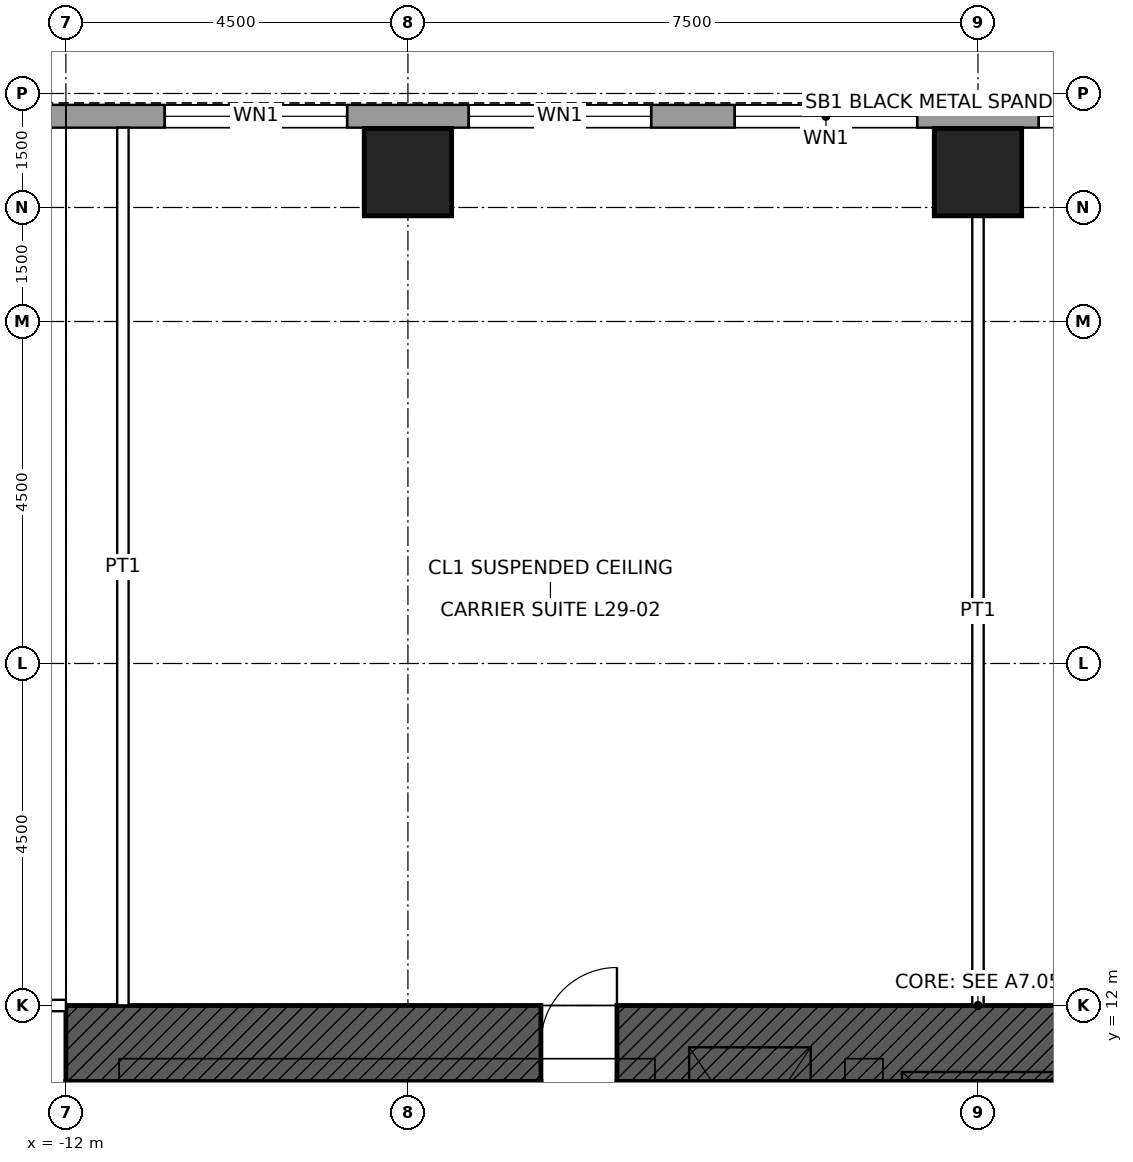
"""IFC4 building model, lengths in metres.
Left out: names, types, materials, properties, quantities, classifications, styles, units other than length and angle.
Written with IfcOpenShell. Run it as: python <this file> out.ifc"""

import sys

from ifc_helpers import new_model, si_unit, direction, frame, frame_2d, origin, origin_2d, place, context, subcontext, project, spatial, rectangle, hollow_rectangle, extrude, element, fill, save


model = new_model("IFC4")
c1 = context("Model", 3, precision=1e-05, world=origin(), true_north=direction((0.0, 1.0)))
c2 = subcontext(c1, "Body", "Model", "MODEL_VIEW")
j1 = project(units=[si_unit("LENGTHUNIT", "METRE"), si_unit("PLANEANGLEUNIT", "RADIAN")], contexts=[c1])
p1 = place(None, origin())
s1 = spatial("IfcSite", under=j1, at=p1, CompositionType="ELEMENT")
p2 = place(p1, origin())
s2 = spatial("IfcBuilding", under=s1, at=p2, CompositionType="ELEMENT")
p3 = place(p2, frame((0.0, 0.0, 144.9)))
s3 = spatial("IfcBuildingStorey", under=s2, at=p3, CompositionType="ELEMENT", Elevation=144.9)
for number, where, z_axis, x_axis in (
    (1, (-7.5, 22.965, 0.0), (0.0, 0.0, 1.0), (1.0, 0.0, 0.0)),
    (2, (0.0, 22.965, 0.0), (0.0, 0.0, 1.0), (1.0, 0.0, 0.0)),
):
    element("IfcColumn", number, at=place(p3, frame(where, z_axis=z_axis, x_axis=x_axis)), inside=s3, PredefinedType="COLUMN", context=c2, shape_type="SweptSolid", body=[
        extrude(hollow_rectangle(XDim=1.15, YDim=1.15, WallThickness=0.075, at=origin_2d()), origin(), (0.0, 0.0, 1.0), 4.5),
    ])
p4 = place(p3, frame((-12.0, 11.5, 0.0), z_axis=(0.0, 0.0, 1.0), x_axis=(1.0, 0.0, 0.0)))
e3 = element("IfcWall", 3, at=p4, inside=s3, PredefinedType="SHEAR", context=c2, shape_type="SweptSolid", body=[
    extrude(rectangle(XDim=24.0, YDim=1.0, at=frame_2d((12.0, 0.0))), origin(), (0.0, 0.0, 1.0), 4.5),
])
p5 = place(p4, frame((6.25, 0.0, 0.0)))
e4 = element("IfcOpeningElement", 4, at=p5, cuts=e3, PredefinedType="OPENING", context=c2, shape_type="SweptSolid", body=[
    extrude(rectangle(XDim=1.0, YDim=2.4, at=frame_2d((0.5, 1.2))), frame((0.0, 0.51, 0.0), z_axis=(0.0, -1.0, 0.0), x_axis=(1.0, 0.0, 0.0)), (0.0, 0.0, 1.0), 1.02),
])
p6 = place(p4, frame((16.75, 0.0, 0.0)))
e5 = element("IfcOpeningElement", 5, at=p6, cuts=e3, PredefinedType="OPENING", context=c2, shape_type="SweptSolid", body=[
    extrude(rectangle(XDim=1.0, YDim=2.4, at=frame_2d((0.5, 1.2))), frame((0.0, 0.51, 0.0), z_axis=(0.0, -1.0, 0.0), x_axis=(1.0, 0.0, 0.0)), (0.0, 0.0, 1.0), 1.02),
])
p7 = place(p3, frame((-16.2, 23.7, 0.0), z_axis=(0.0, 0.0, 1.0), x_axis=(1.0, 0.0, 0.0)))
e6 = element("IfcWall", 6, at=p7, inside=s3, PredefinedType="SOLIDWALL", context=c2, shape_type="SweptSolid", body=[
    extrude(rectangle(XDim=32.4, YDim=0.3, at=frame_2d((16.2, 0.0))), origin(), (0.0, 0.0, 1.0), 4.3),
])
p8 = place(p7, frame((0.95, 0.0, 1.0)))
e7 = element("IfcOpeningElement", 7, at=p8, cuts=e6, PredefinedType="OPENING", context=c2, shape_type="SweptSolid", body=[
    extrude(rectangle(XDim=1.8, YDim=1.2, at=frame_2d((0.9, 0.6))), frame((0.0, 0.16, 0.0), z_axis=(0.0, -1.0, 0.0), x_axis=(1.0, 0.0, 0.0)), (0.0, 0.0, 1.0), 0.32),
])
p9 = place(p7, frame((5.5, 0.0, 1.0)))
e8 = element("IfcOpeningElement", 8, at=p9, cuts=e6, PredefinedType="OPENING", context=c2, shape_type="SweptSolid", body=[
    extrude(rectangle(XDim=2.4, YDim=1.2, at=frame_2d((1.2, 0.6))), frame((0.0, 0.16, 0.0), z_axis=(0.0, -1.0, 0.0), x_axis=(1.0, 0.0, 0.0)), (0.0, 0.0, 1.0), 0.32),
])
p10 = place(p7, frame((9.5, 0.0, 1.0)))
e9 = element("IfcOpeningElement", 9, at=p10, cuts=e6, PredefinedType="OPENING", context=c2, shape_type="SweptSolid", body=[
    extrude(rectangle(XDim=2.4, YDim=1.2, at=frame_2d((1.2, 0.6))), frame((0.0, 0.16, 0.0), z_axis=(0.0, -1.0, 0.0), x_axis=(1.0, 0.0, 0.0)), (0.0, 0.0, 1.0), 0.32),
])
p11 = place(p7, frame((13.0, 0.0, 1.0)))
e10 = element("IfcOpeningElement", 10, at=p11, cuts=e6, PredefinedType="OPENING", context=c2, shape_type="SweptSolid", body=[
    extrude(rectangle(XDim=2.4, YDim=1.2, at=frame_2d((1.2, 0.6))), frame((0.0, 0.16, 0.0), z_axis=(0.0, -1.0, 0.0), x_axis=(1.0, 0.0, 0.0)), (0.0, 0.0, 1.0), 0.32),
])
p12 = place(p7, frame((17.0, 0.0, 1.0)))
e11 = element("IfcOpeningElement", 11, at=p12, cuts=e6, PredefinedType="OPENING", context=c2, shape_type="SweptSolid", body=[
    extrude(rectangle(XDim=2.4, YDim=1.2, at=frame_2d((1.2, 0.6))), frame((0.0, 0.16, 0.0), z_axis=(0.0, -1.0, 0.0), x_axis=(1.0, 0.0, 0.0)), (0.0, 0.0, 1.0), 0.32),
])
p13 = place(p7, frame((20.5, 0.0, 1.0)))
e12 = element("IfcOpeningElement", 12, at=p13, cuts=e6, PredefinedType="OPENING", context=c2, shape_type="SweptSolid", body=[
    extrude(rectangle(XDim=2.4, YDim=1.2, at=frame_2d((1.2, 0.6))), frame((0.0, 0.16, 0.0), z_axis=(0.0, -1.0, 0.0), x_axis=(1.0, 0.0, 0.0)), (0.0, 0.0, 1.0), 0.32),
])
p14 = place(p7, frame((24.5, 0.0, 1.0)))
e13 = element("IfcOpeningElement", 13, at=p14, cuts=e6, PredefinedType="OPENING", context=c2, shape_type="SweptSolid", body=[
    extrude(rectangle(XDim=2.4, YDim=1.2, at=frame_2d((1.2, 0.6))), frame((0.0, 0.16, 0.0), z_axis=(0.0, -1.0, 0.0), x_axis=(1.0, 0.0, 0.0)), (0.0, 0.0, 1.0), 0.32),
])
p15 = place(p7, frame((29.65, 0.0, 1.0)))
e14 = element("IfcOpeningElement", 14, at=p15, cuts=e6, PredefinedType="OPENING", context=c2, shape_type="SweptSolid", body=[
    extrude(rectangle(XDim=1.8, YDim=1.2, at=frame_2d((0.9, 0.6))), frame((0.0, 0.16, 0.0), z_axis=(0.0, -1.0, 0.0), x_axis=(1.0, 0.0, 0.0)), (0.0, 0.0, 1.0), 0.32),
])
p16 = place(p3, frame((-14.075, 12.0, 0.0), z_axis=(0.0, 0.0, 1.0), x_axis=(1.0, 0.0, 0.0)))
e15 = element("IfcWall", 15, at=p16, inside=s3, PredefinedType="PARTITIONING", context=c2, shape_type="SweptSolid", body=[
    extrude(rectangle(XDim=2.075, YDim=0.15, at=frame_2d((1.038, 0.0))), origin(), (0.0, 0.0, 1.0), 4.3),
])
p17 = place(p16, frame((0.575, 0.0, 0.0)))
e16 = element("IfcOpeningElement", 16, at=p17, cuts=e15, PredefinedType="OPENING", context=c2, shape_type="SweptSolid", body=[
    extrude(rectangle(XDim=1.0, YDim=2.1, at=frame_2d((0.5, 1.05))), frame((0.0, 0.085, 0.0), z_axis=(0.0, -1.0, 0.0), x_axis=(1.0, 0.0, 0.0)), (0.0, 0.0, 1.0), 0.17),
])
p18 = place(p3, frame((-11.25, 12.0, 0.0), z_axis=(0.0, 0.0, 1.0), x_axis=(0.0, 1.0, 0.0)))
e17 = element("IfcWall", 17, at=p18, inside=s3, PredefinedType="PARTITIONING", context=c2, shape_type="SweptSolid", body=[
    extrude(rectangle(XDim=11.55, YDim=0.15, at=frame_2d((5.775, 0.0))), origin(), (0.0, 0.0, 1.0), 3.431),
])
p19 = place(p3, frame((0.0, 12.0, 0.0), z_axis=(0.0, 0.0, 1.0), x_axis=(0.0, 1.0, 0.0)))
e18 = element("IfcWall", 18, at=p19, inside=s3, PredefinedType="PARTITIONING", context=c2, shape_type="SweptSolid", body=[
    extrude(rectangle(XDim=10.39, YDim=0.15, at=frame_2d((5.195, 0.0))), origin(), (0.0, 0.0, 1.0), 3.431),
])
p20 = place(p9, origin())
e19 = element("IfcWindow", 19, at=p20, inside=s3, PartitioningType="SINGLE_PANEL", PredefinedType="WINDOW", context=c2, shape_type="SweptSolid", body=[
    extrude(rectangle(XDim=2.4, YDim=1.2, at=frame_2d((1.2, 0.6))), frame((0.0, 0.03, 0.0), z_axis=(0.0, -1.0, 0.0), x_axis=(1.0, 0.0, 0.0)), (0.0, 0.0, 1.0), 0.06),
])
fill(e8, e19)
p21 = place(p10, origin())
e20 = element("IfcWindow", 20, at=p21, inside=s3, PartitioningType="SINGLE_PANEL", PredefinedType="WINDOW", context=c2, shape_type="SweptSolid", body=[
    extrude(rectangle(XDim=2.4, YDim=1.2, at=frame_2d((1.2, 0.6))), frame((0.0, 0.03, 0.0), z_axis=(0.0, -1.0, 0.0), x_axis=(1.0, 0.0, 0.0)), (0.0, 0.0, 1.0), 0.06),
])
fill(e9, e20)
p22 = place(p11, origin())
e21 = element("IfcWindow", 21, at=p22, inside=s3, PartitioningType="SINGLE_PANEL", PredefinedType="WINDOW", context=c2, shape_type="SweptSolid", body=[
    extrude(rectangle(XDim=2.4, YDim=1.2, at=frame_2d((1.2, 0.6))), frame((0.0, 0.03, 0.0), z_axis=(0.0, -1.0, 0.0), x_axis=(1.0, 0.0, 0.0)), (0.0, 0.0, 1.0), 0.06),
])
fill(e10, e21)
p23 = place(p12, origin())
e22 = element("IfcWindow", 22, at=p23, inside=s3, PartitioningType="SINGLE_PANEL", PredefinedType="WINDOW", context=c2, shape_type="SweptSolid", body=[
    extrude(rectangle(XDim=2.4, YDim=1.2, at=frame_2d((1.2, 0.6))), frame((0.0, 0.03, 0.0), z_axis=(0.0, -1.0, 0.0), x_axis=(1.0, 0.0, 0.0)), (0.0, 0.0, 1.0), 0.06),
])
fill(e11, e22)
p24 = place(p5, origin())
e23 = element("IfcDoor", 23, at=p24, inside=s3, OperationType="SINGLE_SWING_RIGHT", PredefinedType="DOOR", context=c2, shape_type="SweptSolid", body=[
    extrude(rectangle(XDim=1.0, YDim=2.4, at=frame_2d((0.5, 1.2))), frame((0.0, 0.485, 0.0), z_axis=(0.0, -1.0, 0.0), x_axis=(1.0, 0.0, 0.0)), (0.0, 0.0, 1.0), 0.05),
])
fill(e4, e23)
save(model, sys.argv[1])
